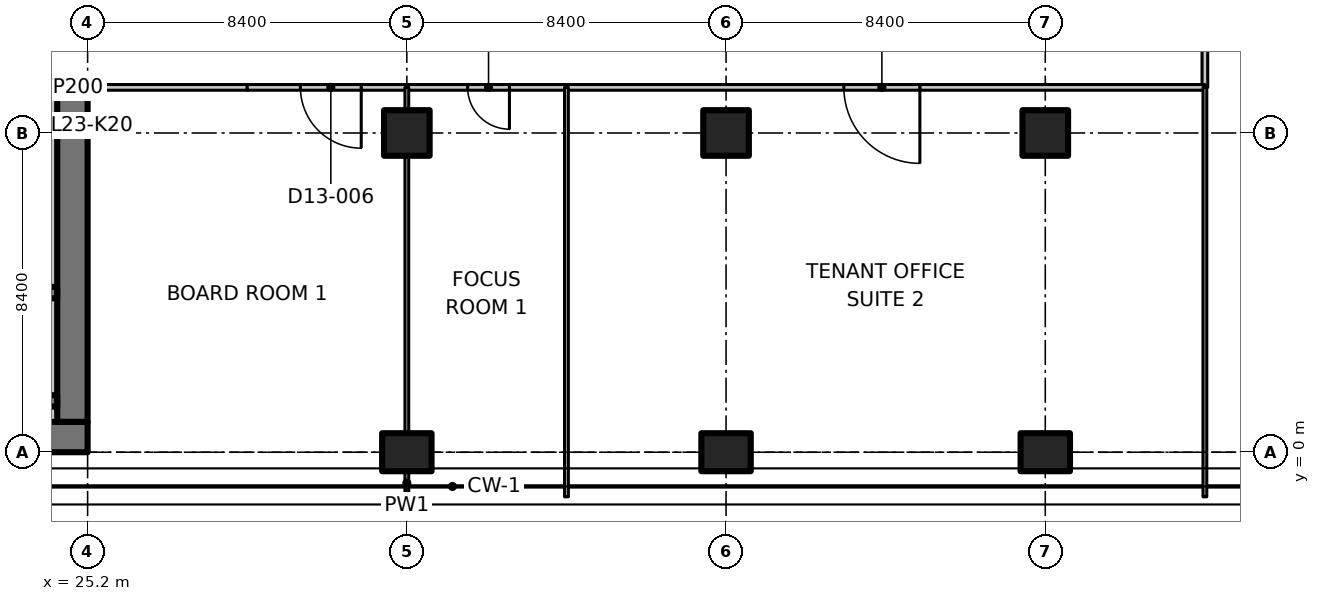
"""IFC4 building model, lengths in metres.
Left out: names, types, materials, properties, quantities, classifications, styles, units other than length and angle.
Written with IfcOpenShell. Run it as: python <this file> out.ifc"""

import sys

from ifc_helpers import new_model, si_unit, direction, frame, frame_2d, origin, origin_2d, place, context, subcontext, project, spatial, polyline, rectangle, outline, extrude, element, fill, save


model = new_model("IFC4")
c1 = context("Model", 3, precision=1e-05, world=origin(), true_north=direction((0.0, 1.0)))
c2 = subcontext(c1, "Body", "Model", "MODEL_VIEW")
j1 = project(units=[si_unit("LENGTHUNIT", "METRE"), si_unit("PLANEANGLEUNIT", "RADIAN")], contexts=[c1])
p1 = place(None, origin())
s1 = spatial("IfcSite", under=j1, at=p1, CompositionType="ELEMENT")
p2 = place(p1, origin())
s2 = spatial("IfcBuilding", under=s1, at=p2, CompositionType="ELEMENT")
p3 = place(p2, frame((0.0, 0.0, 98.9)))
s3 = spatial("IfcBuildingStorey", under=s2, at=p3, CompositionType="ELEMENT", Elevation=98.9)
p4 = place(p3, frame((33.6, 0.0, 0.0), z_axis=(0.0, 0.0, 1.0), x_axis=(0.0, 1.0, 0.0)))
e1 = element("IfcColumn", 1, at=p4, inside=s3, PredefinedType="COLUMN", context=c2, shape_type="SweptSolid", body=[
    extrude(rectangle(XDim=1.0, YDim=1.3, at=origin_2d()), origin(), (0.0, 0.0, 1.0), 3.35),
])
p5 = place(p3, frame((33.6, 8.4, 0.0), z_axis=(0.0, 0.0, 1.0), x_axis=(1.0, 0.0, 0.0)))
e2 = element("IfcColumn", 2, at=p5, inside=s3, PredefinedType="COLUMN", context=c2, shape_type="SweptSolid", body=[
    extrude(rectangle(XDim=1.2, YDim=1.2, at=origin_2d()), origin(), (0.0, 0.0, 1.0), 3.35),
])
p6 = place(p3, frame((42.0, 0.0, 0.0), z_axis=(0.0, 0.0, 1.0), x_axis=(0.0, 1.0, 0.0)))
e3 = element("IfcColumn", 3, at=p6, inside=s3, PredefinedType="COLUMN", context=c2, shape_type="SweptSolid", body=[
    extrude(rectangle(XDim=1.0, YDim=1.3, at=origin_2d()), origin(), (0.0, 0.0, 1.0), 3.35),
])
p7 = place(p3, frame((42.0, 8.4, 0.0), z_axis=(0.0, 0.0, 1.0), x_axis=(1.0, 0.0, 0.0)))
e4 = element("IfcColumn", 4, at=p7, inside=s3, PredefinedType="COLUMN", context=c2, shape_type="SweptSolid", body=[
    extrude(rectangle(XDim=1.2, YDim=1.2, at=origin_2d()), origin(), (0.0, 0.0, 1.0), 3.35),
])
p8 = place(p3, frame((50.4, 0.0, 0.0), z_axis=(0.0, 0.0, 1.0), x_axis=(0.0, 1.0, 0.0)))
e5 = element("IfcColumn", 5, at=p8, inside=s3, PredefinedType="COLUMN", context=c2, shape_type="SweptSolid", body=[
    extrude(rectangle(XDim=1.0, YDim=1.3, at=origin_2d()), origin(), (0.0, 0.0, 1.0), 3.35),
])
p9 = place(p3, frame((50.4, 8.4, 0.0), z_axis=(0.0, 0.0, 1.0), x_axis=(1.0, 0.0, 0.0)))
e6 = element("IfcColumn", 6, at=p9, inside=s3, PredefinedType="COLUMN", context=c2, shape_type="SweptSolid", body=[
    extrude(rectangle(XDim=1.2, YDim=1.2, at=origin_2d()), origin(), (0.0, 0.0, 1.0), 3.35),
])
p10 = place(p3, frame((7.136, 0.4, 0.0), z_axis=(0.0, 0.0, 1.0), x_axis=(1.0, 0.0, 0.0)))
e7 = element("IfcWall", 7, at=p10, inside=s3, PredefinedType="SHEAR", context=c2, shape_type="SweptSolid", body=[
    extrude(rectangle(XDim=18.063, YDim=0.8, at=frame_2d((9.032, 0.0))), origin(), (0.0, 0.0, 1.0), 3.35),
])
p11 = place(p3, frame((24.8, 0.8, 0.0), z_axis=(0.0, 0.0, 1.0), x_axis=(0.0, 1.0, 0.0)))
e8 = element("IfcWall", 8, at=p11, inside=s3, PredefinedType="SHEAR", context=c2, shape_type="SweptSolid", body=[
    extrude(rectangle(XDim=9.0, YDim=0.8, at=frame_2d((4.5, 0.0))), origin(), (0.0, 0.0, 1.0), 3.35),
])
p12 = place(p3, frame((15.8, 1.35, 0.0), z_axis=(0.0, 0.0, 1.0), x_axis=(1.0, 0.0, 0.0)))
e9 = element("IfcWall", 9, at=p12, inside=s3, PredefinedType="SHEAR", context=c2, shape_type="SweptSolid", body=[
    extrude(rectangle(XDim=8.6, YDim=0.3, at=frame_2d((4.3, 0.0))), origin(), (0.0, 0.0, 1.0), 3.35),
])
p13 = place(p3, frame((15.8, 4.2, 0.0), z_axis=(0.0, 0.0, 1.0), x_axis=(1.0, 0.0, 0.0)))
e10 = element("IfcWall", 10, at=p13, inside=s3, PredefinedType="SHEAR", context=c2, shape_type="SweptSolid", body=[
    extrude(rectangle(XDim=8.6, YDim=0.3, at=frame_2d((4.3, 0.0))), origin(), (0.0, 0.0, 1.0), 3.35),
])
p14 = place(p13, frame((0.4, 0.0, 0.0)))
e11 = element("IfcOpeningElement", 11, at=p14, cuts=e10, PredefinedType="OPENING", context=c2, shape_type="SweptSolid", body=[
    extrude(rectangle(XDim=1.0, YDim=2.1, at=frame_2d((0.5, 1.05))), frame((0.0, 0.16, 0.0), z_axis=(0.0, -1.0, 0.0), x_axis=(1.0, 0.0, 0.0)), (0.0, 0.0, 1.0), 0.32),
])
p15 = place(p3, frame((13.35, 1.0, 0.0), z_axis=(0.0, 0.0, 1.0), x_axis=(1.0, 0.0, 0.0)))
e12 = element("IfcWall", 12, at=p15, inside=s3, PredefinedType="PARTITIONING", context=c2, shape_type="SweptSolid", body=[
    extrude(rectangle(XDim=11.05, YDim=0.4, at=frame_2d((5.525, 0.0))), origin(), (0.0, 0.0, 1.0), 3.35),
])
p16 = place(p3, frame((24.2, 1.5, 0.0), z_axis=(0.0, 0.0, 1.0), x_axis=(0.0, 1.0, 0.0)))
e13 = element("IfcWall", 13, at=p16, inside=s3, PredefinedType="PARTITIONING", context=c2, shape_type="SweptSolid", body=[
    extrude(rectangle(XDim=2.55, YDim=0.4, at=frame_2d((1.275, 0.0))), origin(), (0.0, 0.0, 1.0), 3.35),
])
p17 = place(p3, frame((24.2, 4.35, 0.0), z_axis=(0.0, 0.0, 1.0), x_axis=(0.0, 1.0, 0.0)))
e14 = element("IfcWall", 14, at=p17, inside=s3, PredefinedType="PARTITIONING", context=c2, shape_type="SweptSolid", body=[
    extrude(rectangle(XDim=5.45, YDim=0.4, at=frame_2d((2.725, 0.0))), origin(), (0.0, 0.0, 1.0), 3.35),
])
p18 = place(p3, frame((29.4, 9.6, 0.0), z_axis=(0.0, 0.0, 1.0), x_axis=(-1.0, 0.0, 0.0)))
e15 = element("IfcWall", 15, at=p18, inside=s3, PredefinedType="PARTITIONING", context=c2, shape_type="SweptSolid", body=[
    extrude(rectangle(XDim=4.2, YDim=0.15, at=frame_2d((2.1, 0.0))), origin(), (0.0, 0.0, 1.0), 3.33),
])
p19 = place(p3, frame((54.6, 13.0, 0.0), z_axis=(0.0, 0.0, 1.0), x_axis=(0.0, -1.0, 0.0)))
e16 = element("IfcWall", 16, at=p19, inside=s3, PredefinedType="PARTITIONING", context=c2, shape_type="SweptSolid", body=[
    extrude(rectangle(XDim=3.4, YDim=0.15, at=frame_2d((1.7, 0.0))), origin(), (0.0, 0.0, 1.0), 3.33),
])
p20 = place(p3, frame((33.6, 9.6, 0.0), z_axis=(0.0, 0.0, 1.0), x_axis=(-1.0, 0.0, 0.0)))
e17 = element("IfcWall", 17, at=p20, inside=s3, PredefinedType="PARTITIONING", context=c2, shape_type="SweptSolid", body=[
    extrude(rectangle(XDim=4.2, YDim=0.15, at=frame_2d((2.1, 0.0))), origin(), (0.0, 0.0, 1.0), 3.33),
])
p21 = place(p20, frame((1.2, 0.0, 0.0)))
e18 = element("IfcOpeningElement", 18, at=p21, cuts=e17, PredefinedType="OPENING", context=c2, shape_type="SweptSolid", body=[
    extrude(rectangle(XDim=1.6, YDim=2.1, at=frame_2d((0.8, 1.05))), frame((0.0, 0.085, 0.0), z_axis=(0.0, -1.0, 0.0), x_axis=(1.0, 0.0, 0.0)), (0.0, 0.0, 1.0), 0.17),
])
p22 = place(p3, frame((37.8, 9.6, 0.0), z_axis=(0.0, 0.0, 1.0), x_axis=(-1.0, 0.0, 0.0)))
e19 = element("IfcWall", 19, at=p22, inside=s3, PredefinedType="PARTITIONING", context=c2, shape_type="SweptSolid", body=[
    extrude(rectangle(XDim=4.2, YDim=0.15, at=frame_2d((2.1, 0.0))), origin(), (0.0, 0.0, 1.0), 3.33),
])
p23 = place(p22, frame((1.5, 0.0, 0.0)))
e20 = element("IfcOpeningElement", 20, at=p23, cuts=e19, PredefinedType="OPENING", context=c2, shape_type="SweptSolid", body=[
    extrude(rectangle(XDim=1.1, YDim=2.1, at=frame_2d((0.55, 1.05))), frame((0.0, 0.085, 0.0), z_axis=(0.0, -1.0, 0.0), x_axis=(1.0, 0.0, 0.0)), (0.0, 0.0, 1.0), 0.17),
])
p24 = place(p3, frame((54.6, 9.6, 0.0), z_axis=(0.0, 0.0, 1.0), x_axis=(-1.0, 0.0, 0.0)))
e21 = element("IfcWall", 21, at=p24, inside=s3, PredefinedType="PARTITIONING", context=c2, shape_type="SweptSolid", body=[
    extrude(rectangle(XDim=16.8, YDim=0.15, at=frame_2d((8.4, 0.0))), origin(), (0.0, 0.0, 1.0), 3.33),
])
p25 = place(p24, frame((7.5, 0.0, 0.0)))
e22 = element("IfcOpeningElement", 22, at=p25, cuts=e21, PredefinedType="OPENING", context=c2, shape_type="SweptSolid", body=[
    extrude(rectangle(XDim=2.0, YDim=2.4, at=frame_2d((1.0, 1.2))), frame((0.0, 0.085, 0.0), z_axis=(0.0, -1.0, 0.0), x_axis=(1.0, 0.0, 0.0)), (0.0, 0.0, 1.0), 0.17),
])
p26 = place(p3, frame((54.6, -1.174, 0.0), z_axis=(0.0, 0.0, 1.0), x_axis=(0.0, 1.0, 0.0)))
e23 = element("IfcWall", 23, at=p26, inside=s3, PredefinedType="PARTITIONING", context=c2, shape_type="SweptSolid", body=[
    extrude(outline(polyline([(0.0, 0.0), (10.774, 0.0), (10.774, 3.33), (1.624, 3.33), (1.622, 2.98), (0.726, 2.98), (0.724, 3.33), (0.074, 3.33), (0.0, 3.33), (0.0, 0.0)])), frame((0.0, 0.05, 0.0), z_axis=(0.0, -1.0, 0.0), x_axis=(1.0, 0.0, 0.0)), (0.0, 0.0, 1.0), 0.1),
])
p27 = place(p3, frame((33.6, 9.6, 0.0), z_axis=(0.0, 0.0, 1.0), x_axis=(0.0, -1.0, 0.0)))
e24 = element("IfcWall", 24, at=p27, inside=s3, PredefinedType="PARTITIONING", context=c2, shape_type="SweptSolid", body=[
    extrude(rectangle(XDim=0.58, YDim=0.1, at=frame_2d((0.29, 0.0))), origin(), (0.0, 0.0, 1.0), 3.33),
])
p28 = place(p3, frame((33.6, 7.78, 0.0), z_axis=(0.0, 0.0, 1.0), x_axis=(0.0, -1.0, 0.0)))
e25 = element("IfcWall", 25, at=p28, inside=s3, PredefinedType="PARTITIONING", context=c2, shape_type="SweptSolid", body=[
    extrude(rectangle(XDim=7.26, YDim=0.1, at=frame_2d((3.63, 0.0))), origin(), (0.0, 0.0, 1.0), 3.33),
])
p29 = place(p3, frame((33.6, -0.52, 0.0), z_axis=(0.0, 0.0, 1.0), x_axis=(0.0, -1.0, 0.0)))
e26 = element("IfcWall", 26, at=p29, inside=s3, PredefinedType="PARTITIONING", context=c2, shape_type="SweptSolid", body=[
    extrude(rectangle(XDim=0.58, YDim=0.1, at=frame_2d((0.29, 0.0))), origin(), (0.0, 0.0, 1.0), 3.33),
])
p30 = place(p3, frame((37.8, 9.6, 0.0), z_axis=(0.0, 0.0, 1.0), x_axis=(0.0, -1.0, 0.0)))
e27 = element("IfcWall", 27, at=p30, inside=s3, PredefinedType="PARTITIONING", context=c2, shape_type="SweptSolid", body=[
    extrude(outline(polyline([(0.0, 0.0), (10.774, 0.0), (10.774, 3.33), (10.7, 3.33), (10.05, 3.33), (10.048, 2.98), (9.152, 2.98), (9.15, 3.33), (0.0, 3.33), (0.0, 0.0)])), frame((0.0, 0.05, 0.0), z_axis=(0.0, -1.0, 0.0), x_axis=(1.0, 0.0, 0.0)), (0.0, 0.0, 1.0), 0.1),
])
p31 = place(p21, origin())
e28 = element("IfcDoor", 28, at=p31, inside=s3, OperationType="DOUBLE_DOOR_SINGLE_SWING", PredefinedType="DOOR", context=c2, shape_type="SweptSolid", body=[
    extrude(rectangle(XDim=1.6, YDim=2.1, at=frame_2d((0.8, 1.05))), frame((0.0, 0.025, 0.0), z_axis=(0.0, -1.0, 0.0), x_axis=(1.0, 0.0, 0.0)), (0.0, 0.0, 1.0), 0.05),
])
fill(e18, e28)
p32 = place(p23, origin())
e29 = element("IfcDoor", 29, at=p32, inside=s3, OperationType="SINGLE_SWING_LEFT", PredefinedType="DOOR", context=c2, shape_type="SweptSolid", body=[
    extrude(rectangle(XDim=1.1, YDim=2.1, at=frame_2d((0.55, 1.05))), frame((0.0, 0.025, 0.0), z_axis=(0.0, -1.0, 0.0), x_axis=(1.0, 0.0, 0.0)), (0.0, 0.0, 1.0), 0.05),
])
fill(e20, e29)
p33 = place(p25, origin())
e30 = element("IfcDoor", 30, at=p33, inside=s3, OperationType="DOUBLE_DOOR_SINGLE_SWING", PredefinedType="DOOR", context=c2, shape_type="SweptSolid", body=[
    extrude(rectangle(XDim=2.0, YDim=2.4, at=frame_2d((1.0, 1.2))), frame((0.0, 0.025, 0.0), z_axis=(0.0, -1.0, 0.0), x_axis=(1.0, 0.0, 0.0)), (0.0, 0.0, 1.0), 0.05),
])
fill(e22, e30)
save(model, sys.argv[1])
